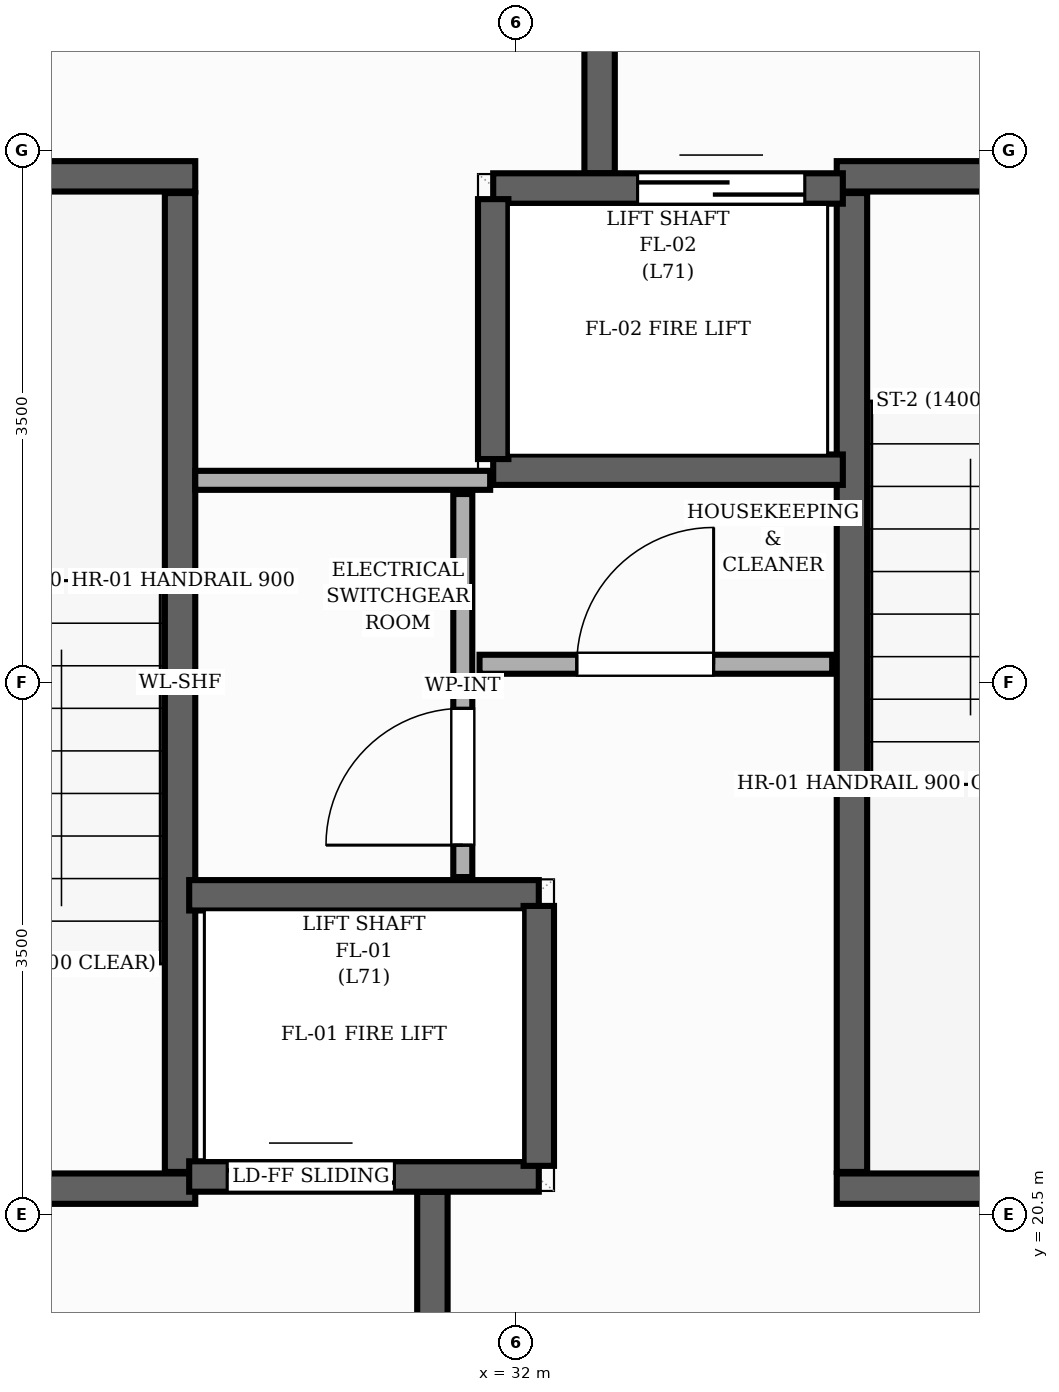
"""IFC4 building model, lengths in metres.
Left out: names, types, materials, properties, quantities, classifications, styles, units other than length and angle.
Written with IfcOpenShell. Run it as: python <this file> out.ifc"""

import sys

from ifc_helpers import new_model, si_unit, direction, frame, frame_2d, origin, place, context, subcontext, project, spatial, rectangle, extrude, element, fill, save


model = new_model("IFC4")
c1 = context("Model", 3, precision=1e-05, world=origin(), true_north=direction((0.0, 1.0)))
c2 = subcontext(c1, "Body", "Model", "MODEL_VIEW")
j1 = project(units=[si_unit("LENGTHUNIT", "METRE"), si_unit("PLANEANGLEUNIT", "RADIAN")], contexts=[c1])
p1 = place(None, origin())
s1 = spatial("IfcSite", under=j1, at=p1, CompositionType="ELEMENT")
p2 = place(p1, origin())
s2 = spatial("IfcBuilding", under=s1, at=p2, CompositionType="ELEMENT")
p3 = place(p2, frame((0.0, 0.0, 236.64)))
s3 = spatial("IfcBuildingStorey", under=s2, at=p3, CompositionType="ELEMENT", Elevation=236.64)
p4 = place(p3, frame((29.79, 20.78, 0.0), z_axis=(0.0, 0.0, 1.0), x_axis=(0.0, 1.0, 0.0)))
e1 = element("IfcWall", 1, at=p4, inside=s3, PredefinedType="SHEAR", context=c2, shape_type="SweptSolid", body=[
    extrude(rectangle(XDim=6.44, YDim=0.2, at=frame_2d((3.22, 0.0))), origin(), (0.0, 0.0, 1.0), 3.2),
])
p5 = place(p3, frame((26.65, 27.33, 0.0), z_axis=(0.0, 0.0, 1.0), x_axis=(1.0, 0.0, 0.0)))
e2 = element("IfcWall", 2, at=p5, inside=s3, PredefinedType="SHEAR", context=c2, shape_type="SweptSolid", body=[
    extrude(rectangle(XDim=3.24, YDim=0.2, at=frame_2d((1.62, 0.0))), origin(), (0.0, 0.0, 1.0), 3.2),
])
p6 = place(p3, frame((26.65, 20.67, 0.0), z_axis=(0.0, 0.0, 1.0), x_axis=(1.0, 0.0, 0.0)))
e3 = element("IfcWall", 3, at=p6, inside=s3, PredefinedType="SHEAR", context=c2, shape_type="SweptSolid", body=[
    extrude(rectangle(XDim=3.24, YDim=0.2, at=frame_2d((1.62, 0.0))), origin(), (0.0, 0.0, 1.0), 3.2),
])
p7 = place(p6, frame((1.055, 0.0, 0.0)))
e4 = element("IfcOpeningElement", 4, at=p7, cuts=e3, PredefinedType="OPENING", context=c2, shape_type="SweptSolid", body=[
    extrude(rectangle(XDim=1.05, YDim=2.15, at=frame_2d((0.525, 1.075))), frame((0.0, 0.11, 0.0), z_axis=(0.0, -1.0, 0.0), x_axis=(1.0, 0.0, 0.0)), (0.0, 0.0, 1.0), 0.22),
])
p8 = place(p3, frame((34.21, 20.78, 0.0), z_axis=(0.0, 0.0, 1.0), x_axis=(0.0, 1.0, 0.0)))
e5 = element("IfcWall", 5, at=p8, inside=s3, PredefinedType="SHEAR", context=c2, shape_type="SweptSolid", body=[
    extrude(rectangle(XDim=6.44, YDim=0.2, at=frame_2d((3.22, 0.0))), origin(), (0.0, 0.0, 1.0), 3.2),
])
p9 = place(p3, frame((34.11, 20.67, 0.0), z_axis=(0.0, 0.0, 1.0), x_axis=(1.0, 0.0, 0.0)))
e6 = element("IfcWall", 6, at=p9, inside=s3, PredefinedType="SHEAR", context=c2, shape_type="SweptSolid", body=[
    extrude(rectangle(XDim=3.24, YDim=0.2, at=frame_2d((1.62, 0.0))), origin(), (0.0, 0.0, 1.0), 3.2),
])
p10 = place(p3, frame((34.11, 27.33, 0.0), z_axis=(0.0, 0.0, 1.0), x_axis=(1.0, 0.0, 0.0)))
e7 = element("IfcWall", 7, at=p10, inside=s3, PredefinedType="SHEAR", context=c2, shape_type="SweptSolid", body=[
    extrude(rectangle(XDim=3.24, YDim=0.2, at=frame_2d((1.62, 0.0))), origin(), (0.0, 0.0, 1.0), 3.2),
])
p11 = place(p10, frame((1.135, 0.0, 0.0)))
e8 = element("IfcOpeningElement", 8, at=p11, cuts=e7, PredefinedType="OPENING", context=c2, shape_type="SweptSolid", body=[
    extrude(rectangle(XDim=1.05, YDim=2.15, at=frame_2d((0.525, 1.075))), frame((0.0, 0.11, 0.0), z_axis=(0.0, -1.0, 0.0), x_axis=(1.0, 0.0, 0.0)), (0.0, 0.0, 1.0), 0.22),
])
for number, where, z_axis, x_axis in (
    (9, (31.45, 17.15, 0.0), (0.0, 0.0, 1.0), (0.0, 1.0, 0.0)),
    (10, (32.55, 27.35, 0.0), (0.0, 0.0, 1.0), (0.0, 1.0, 0.0)),
):
    element("IfcWall", number, at=place(p3, frame(where, z_axis=z_axis, x_axis=x_axis)), inside=s3, PredefinedType="SHEAR", context=c2, shape_type="SweptSolid", body=[
        extrude(rectangle(XDim=3.5, YDim=0.2, at=frame_2d((1.75, 0.0))), origin(), (0.0, 0.0, 1.0), 3.2),
    ])
p12 = place(p3, frame((29.85, 20.75, 0.0), z_axis=(0.0, 0.0, 1.0), x_axis=(1.0, 0.0, 0.0)))
e11 = element("IfcWall", 11, at=p12, inside=s3, PredefinedType="SHEAR", context=c2, shape_type="SweptSolid", body=[
    extrude(rectangle(XDim=2.3, YDim=0.2, at=frame_2d((1.15, 0.0))), origin(), (0.0, 0.0, 1.0), 3.2),
])
p13 = place(p12, frame((0.25, 0.0, 0.0)))
e12 = element("IfcOpeningElement", 12, at=p13, cuts=e11, PredefinedType="OPENING", context=c2, shape_type="SweptSolid", body=[
    extrude(rectangle(XDim=1.1, YDim=2.15, at=frame_2d((0.55, 1.075))), frame((0.0, 0.11, 0.0), z_axis=(0.0, -1.0, 0.0), x_axis=(1.0, 0.0, 0.0)), (0.0, 0.0, 1.0), 0.22),
])
p14 = place(p3, frame((29.85, 22.6, 0.0), z_axis=(0.0, 0.0, 1.0), x_axis=(1.0, 0.0, 0.0)))
e13 = element("IfcWall", 13, at=p14, inside=s3, PredefinedType="SHEAR", context=c2, shape_type="SweptSolid", body=[
    extrude(rectangle(XDim=2.3, YDim=0.2, at=frame_2d((1.15, 0.0))), origin(), (0.0, 0.0, 1.0), 3.2),
])
p15 = place(p3, frame((32.15, 20.82, 0.0), z_axis=(0.0, 0.0, 1.0), x_axis=(0.0, 1.0, 0.0)))
e14 = element("IfcWall", 14, at=p15, inside=s3, PredefinedType="SHEAR", context=c2, shape_type="SweptSolid", body=[
    extrude(rectangle(XDim=1.71, YDim=0.2, at=frame_2d((0.855, 0.0))), origin(), (0.0, 0.0, 1.0), 3.2),
])
p16 = place(p3, frame((31.85, 27.25, 0.0), z_axis=(0.0, 0.0, 1.0), x_axis=(1.0, 0.0, 0.0)))
e15 = element("IfcWall", 15, at=p16, inside=s3, PredefinedType="SHEAR", context=c2, shape_type="SweptSolid", body=[
    extrude(rectangle(XDim=2.3, YDim=0.2, at=frame_2d((1.15, 0.0))), origin(), (0.0, 0.0, 1.0), 3.2),
])
p17 = place(p16, frame((0.95, 0.0, 0.0)))
e16 = element("IfcOpeningElement", 16, at=p17, cuts=e15, PredefinedType="OPENING", context=c2, shape_type="SweptSolid", body=[
    extrude(rectangle(XDim=1.1, YDim=2.15, at=frame_2d((0.55, 1.075))), frame((0.0, 0.11, 0.0), z_axis=(0.0, -1.0, 0.0), x_axis=(1.0, 0.0, 0.0)), (0.0, 0.0, 1.0), 0.22),
])
p18 = place(p3, frame((31.85, 25.4, 0.0), z_axis=(0.0, 0.0, 1.0), x_axis=(1.0, 0.0, 0.0)))
e17 = element("IfcWall", 17, at=p18, inside=s3, PredefinedType="SHEAR", context=c2, shape_type="SweptSolid", body=[
    extrude(rectangle(XDim=2.3, YDim=0.2, at=frame_2d((1.15, 0.0))), origin(), (0.0, 0.0, 1.0), 3.2),
])
p19 = place(p3, frame((31.85, 25.47, 0.0), z_axis=(0.0, 0.0, 1.0), x_axis=(0.0, 1.0, 0.0)))
e18 = element("IfcWall", 18, at=p19, inside=s3, PredefinedType="SHEAR", context=c2, shape_type="SweptSolid", body=[
    extrude(rectangle(XDim=1.71, YDim=0.2, at=frame_2d((0.855, 0.0))), origin(), (0.0, 0.0, 1.0), 3.2),
])
p20 = place(p3, frame((31.65, 22.72, 0.0), z_axis=(0.0, 0.0, 1.0), x_axis=(0.0, 1.0, 0.0)))
e19 = element("IfcWall", 19, at=p20, inside=s3, PredefinedType="PARTITIONING", context=c2, shape_type="SweptSolid", body=[
    extrude(rectangle(XDim=2.52, YDim=0.125, at=frame_2d((1.26, 0.0))), origin(), (0.0, 0.0, 1.0), 2.955),
])
p21 = place(p20, frame((0.21, 0.0, 0.0)))
e20 = element("IfcOpeningElement", 20, at=p21, cuts=e19, PredefinedType="OPENING", context=c2, shape_type="SweptSolid", body=[
    extrude(rectangle(XDim=0.9, YDim=2.1, at=frame_2d((0.45, 1.05))), frame((0.0, 0.073, 0.0), z_axis=(0.0, -1.0, 0.0), x_axis=(1.0, 0.0, 0.0)), (0.0, 0.0, 1.0), 0.145),
])
p22 = place(p3, frame((31.76, 24.12, 0.0), z_axis=(0.0, 0.0, 1.0), x_axis=(1.0, 0.0, 0.0)))
e21 = element("IfcWall", 21, at=p22, inside=s3, PredefinedType="PARTITIONING", context=c2, shape_type="SweptSolid", body=[
    extrude(rectangle(XDim=2.32, YDim=0.125, at=frame_2d((1.16, 0.0))), origin(), (0.0, 0.0, 1.0), 2.955),
])
p23 = place(p22, frame((0.64, 0.0, 0.0)))
e22 = element("IfcOpeningElement", 22, at=p23, cuts=e21, PredefinedType="OPENING", context=c2, shape_type="SweptSolid", body=[
    extrude(rectangle(XDim=0.9, YDim=2.1, at=frame_2d((0.45, 1.05))), frame((0.0, 0.073, 0.0), z_axis=(0.0, -1.0, 0.0), x_axis=(1.0, 0.0, 0.0)), (0.0, 0.0, 1.0), 0.145),
])
p24 = place(p3, frame((29.89, 25.33, 0.0), z_axis=(0.0, 0.0, 1.0), x_axis=(1.0, 0.0, 0.0)))
e23 = element("IfcWall", 23, at=p24, inside=s3, PredefinedType="PARTITIONING", context=c2, shape_type="SweptSolid", body=[
    extrude(rectangle(XDim=1.94, YDim=0.125, at=frame_2d((0.97, 0.0))), origin(), (0.0, 0.0, 1.0), 2.955),
])
p25 = place(p13, origin())
e24 = element("IfcDoor", 24, at=p25, inside=s3, OperationType="DOUBLE_DOOR_SLIDING", PredefinedType="DOOR", context=c2, shape_type="SweptSolid", body=[
    extrude(rectangle(XDim=1.1, YDim=2.15, at=frame_2d((0.55, 1.075))), frame((0.0, 0.025, 0.0), z_axis=(0.0, -1.0, 0.0), x_axis=(1.0, 0.0, 0.0)), (0.0, 0.0, 1.0), 0.05),
])
fill(e12, e24)
p26 = place(p17, origin())
e25 = element("IfcDoor", 25, at=p26, inside=s3, OperationType="DOUBLE_DOOR_SLIDING", PredefinedType="DOOR", context=c2, shape_type="SweptSolid", body=[
    extrude(rectangle(XDim=1.1, YDim=2.15, at=frame_2d((0.55, 1.075))), frame((0.0, 0.025, 0.0), z_axis=(0.0, -1.0, 0.0), x_axis=(1.0, 0.0, 0.0)), (0.0, 0.0, 1.0), 0.05),
])
fill(e16, e25)
p27 = place(p21, origin())
e26 = element("IfcDoor", 26, at=p27, inside=s3, OperationType="SINGLE_SWING_LEFT", PredefinedType="DOOR", context=c2, shape_type="SweptSolid", body=[
    extrude(rectangle(XDim=0.9, YDim=2.1, at=frame_2d((0.45, 1.05))), frame((0.0, 0.025, 0.0), z_axis=(0.0, -1.0, 0.0), x_axis=(1.0, 0.0, 0.0)), (0.0, 0.0, 1.0), 0.05),
])
fill(e20, e26)
p28 = place(p23, origin())
e27 = element("IfcDoor", 27, at=p28, inside=s3, OperationType="SINGLE_SWING_RIGHT", PredefinedType="DOOR", context=c2, shape_type="SweptSolid", body=[
    extrude(rectangle(XDim=0.9, YDim=2.1, at=frame_2d((0.45, 1.05))), frame((0.0, 0.025, 0.0), z_axis=(0.0, -1.0, 0.0), x_axis=(1.0, 0.0, 0.0)), (0.0, 0.0, 1.0), 0.05),
])
fill(e22, e27)
save(model, sys.argv[1])
